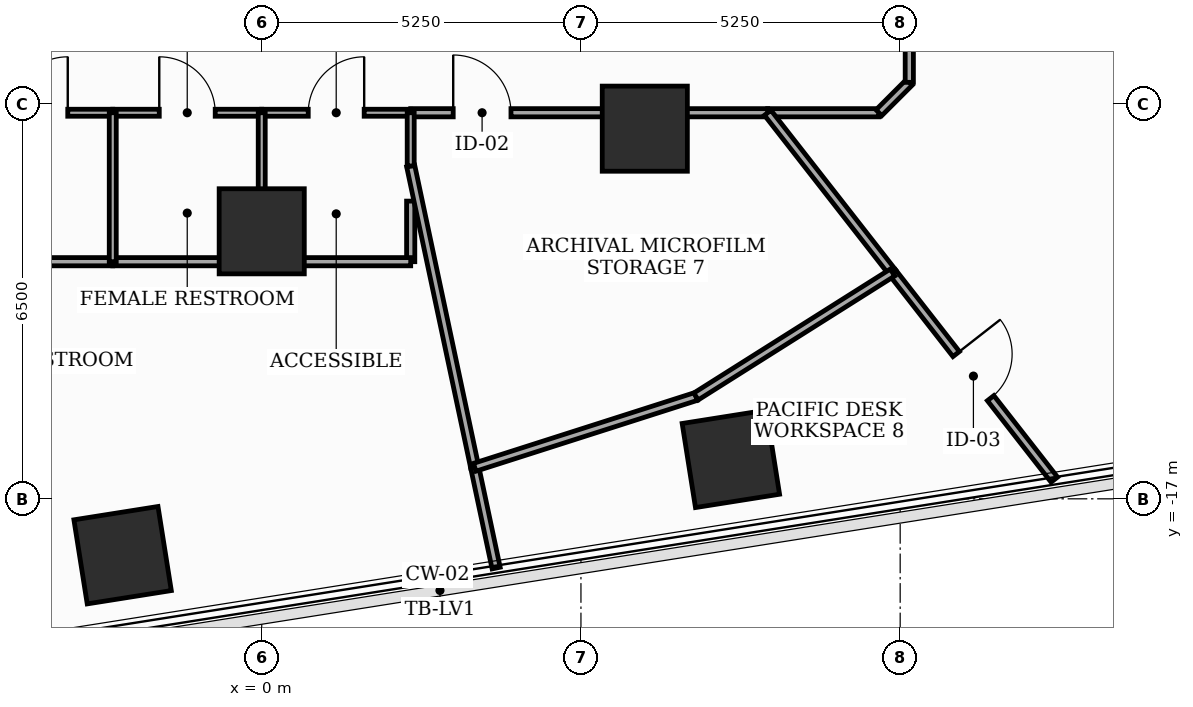
"""IFC4 building model, lengths in metres.
Left out: names, types, materials, properties, quantities, classifications, styles, units other than length and angle.
Written with IfcOpenShell. Run it as: python <this file> out.ifc"""

import sys

from ifc_helpers import new_model, si_unit, direction, frame, frame_2d, origin, origin_2d, place, context, subcontext, project, spatial, rectangle, extrude, element, fill, save


model = new_model("IFC4")
c1 = context("Model", 3, precision=1e-05, world=origin(), true_north=direction((0.0, 1.0)))
c2 = subcontext(c1, "Body", "Model", "MODEL_VIEW")
j1 = project(units=[si_unit("LENGTHUNIT", "METRE"), si_unit("PLANEANGLEUNIT", "RADIAN")], contexts=[c1])
p1 = place(None, origin())
s1 = spatial("IfcSite", under=j1, at=p1, CompositionType="ELEMENT")
p2 = place(p1, origin())
s2 = spatial("IfcBuilding", under=s1, at=p2, CompositionType="ELEMENT")
p3 = place(p2, frame((0.0, 0.0, 81.5)))
s3 = spatial("IfcBuildingStorey", under=s2, at=p3, CompositionType="ELEMENT", Elevation=81.5)
for number, where, z_axis, x_axis in (
    (1, (0.0, -12.6, 0.0), (0.0, 0.0, 1.0), (1.0, 0.0, 0.0)),
    (2, (6.3, -10.912, 0.0), (0.0, 0.0, 1.0), (1.0, 0.0, 0.0)),
    (3, (-2.288, -17.927, 0.0), (0.0, 0.0, 1.0), (0.988, 0.156, 0.0)),
    (4, (7.716, -16.343, 0.0), (0.0, 0.0, 1.0), (0.988, 0.156, 0.0)),
):
    element("IfcColumn", number, at=place(p3, frame(where, z_axis=z_axis, x_axis=x_axis)), inside=s3, PredefinedType="COLUMN", context=c2, shape_type="SweptSolid", body=[
        extrude(rectangle(XDim=1.4, YDim=1.4, at=origin_2d()), origin(), (0.0, 0.0, 1.0), 3.7),
    ])
p4 = place(p3, frame((8.321, -10.65, 0.0), z_axis=(0.0, 0.0, 1.0), x_axis=(1.0, 0.0, 0.0)))
e5 = element("IfcWall", 5, at=p4, inside=s3, PredefinedType="PARTITIONING", context=c2, shape_type="SweptSolid", body=[
    extrude(rectangle(XDim=1.829, YDim=0.135, at=frame_2d((0.915, 0.0))), origin(), (0.0, 0.0, 1.0), 3.46),
])
p5 = place(p3, frame((10.15, -10.65, 0.0), z_axis=(0.0, 0.0, 1.0), x_axis=(0.707106781187, 0.707106781187, 0.0)))
e6 = element("IfcWall", 6, at=p5, inside=s3, PredefinedType="PARTITIONING", context=c2, shape_type="SweptSolid", body=[
    extrude(rectangle(XDim=0.707, YDim=0.135, at=frame_2d((0.354, 0.0))), origin(), (0.0, 0.0, 1.0), 3.46),
])
p6 = place(p3, frame((10.65, -10.15, 0.0), z_axis=(0.0, 0.0, 1.0), x_axis=(0.0, 1.0, 0.0)))
e7 = element("IfcWall", 7, at=p6, inside=s3, PredefinedType="PARTITIONING", context=c2, shape_type="SweptSolid", body=[
    extrude(rectangle(XDim=6.158, YDim=0.135, at=frame_2d((3.079, 0.0))), origin(), (0.0, 0.0, 1.0), 2.045),
])
p7 = place(p3, frame((-4.85, -10.65, 0.0), z_axis=(0.0, 0.0, 1.0), x_axis=(1.0, 0.0, 0.0)))
e8 = element("IfcWall", 8, at=p7, inside=s3, PredefinedType="PARTITIONING", context=c2, shape_type="SweptSolid", body=[
    extrude(rectangle(XDim=2.4, YDim=0.115, at=frame_2d((1.2, 0.0))), origin(), (0.0, 0.0, 1.0), 3.46),
])
p8 = place(p7, frame((0.74, 0.0, 0.0)))
e9 = element("IfcOpeningElement", 9, at=p8, cuts=e8, PredefinedType="OPENING", context=c2, shape_type="SweptSolid", body=[
    extrude(rectangle(XDim=0.92, YDim=2.1, at=frame_2d((0.46, 1.05))), frame((0.0, 0.067, 0.0), z_axis=(0.0, -1.0, 0.0), x_axis=(1.0, 0.0, 0.0)), (0.0, 0.0, 1.0), 0.135),
])
p9 = place(p3, frame((-2.45, -10.65, 0.0), z_axis=(0.0, 0.0, 1.0), x_axis=(1.0, 0.0, 0.0)))
e10 = element("IfcWall", 10, at=p9, inside=s3, PredefinedType="PARTITIONING", context=c2, shape_type="SweptSolid", body=[
    extrude(rectangle(XDim=2.45, YDim=0.115, at=frame_2d((1.225, 0.0))), origin(), (0.0, 0.0, 1.0), 2.745),
])
p10 = place(p9, frame((0.765, 0.0, 0.0)))
e11 = element("IfcOpeningElement", 11, at=p10, cuts=e10, PredefinedType="OPENING", context=c2, shape_type="SweptSolid", body=[
    extrude(rectangle(XDim=0.92, YDim=2.1, at=frame_2d((0.46, 1.05))), frame((0.0, 0.067, 0.0), z_axis=(0.0, -1.0, 0.0), x_axis=(1.0, 0.0, 0.0)), (0.0, 0.0, 1.0), 0.135),
])
p11 = place(p3, frame((0.0, -10.65, 0.0), z_axis=(0.0, 0.0, 1.0), x_axis=(1.0, 0.0, 0.0)))
e12 = element("IfcWall", 12, at=p11, inside=s3, PredefinedType="PARTITIONING", context=c2, shape_type="SweptSolid", body=[
    extrude(rectangle(XDim=2.45, YDim=0.115, at=frame_2d((1.225, 0.0))), origin(), (0.0, 0.0, 1.0), 3.46),
])
p12 = place(p11, frame((0.765, 0.0, 0.0)))
e13 = element("IfcOpeningElement", 13, at=p12, cuts=e12, PredefinedType="OPENING", context=c2, shape_type="SweptSolid", body=[
    extrude(rectangle(XDim=0.92, YDim=2.1, at=frame_2d((0.46, 1.05))), frame((0.0, 0.067, 0.0), z_axis=(0.0, -1.0, 0.0), x_axis=(1.0, 0.0, 0.0)), (0.0, 0.0, 1.0), 0.135),
])
p13 = place(p3, frame((2.45, -10.65, 0.0), z_axis=(0.0, 0.0, 1.0), x_axis=(1.0, 0.0, 0.0)))
e14 = element("IfcWall", 14, at=p13, inside=s3, PredefinedType="PARTITIONING", context=c2, shape_type="SweptSolid", body=[
    extrude(rectangle(XDim=5.871, YDim=0.135, at=frame_2d((2.936, 0.0))), origin(), (0.0, 0.0, 1.0), 2.045),
])
p14 = place(p13, frame((0.699, 0.0, 0.0)))
e15 = element("IfcOpeningElement", 15, at=p14, cuts=e14, PredefinedType="OPENING", context=c2, shape_type="SweptSolid", body=[
    extrude(rectangle(XDim=0.95, YDim=2.0, at=frame_2d((0.475, 1.0))), frame((0.0, 0.077, 0.0), z_axis=(0.0, -1.0, 0.0), x_axis=(1.0, 0.0, 0.0)), (0.0, 0.0, 1.0), 0.155),
])
p15 = place(p3, frame((8.321, -10.65, 0.0), z_axis=(0.0, 0.0, 1.0), x_axis=(0.615591477706, -0.788065436735, 0.0)))
e16 = element("IfcWall", 16, at=p15, inside=s3, PredefinedType="PARTITIONING", context=c2, shape_type="SweptSolid", body=[
    extrude(rectangle(XDim=3.335, YDim=0.135, at=frame_2d((1.667, 0.0))), origin(), (0.0, 0.0, 1.0), 3.46),
])
p16 = place(p3, frame((10.374, -13.278, 0.0), z_axis=(0.0, 0.0, 1.0), x_axis=(0.615554166302, -0.78809458084, 0.0)))
e17 = element("IfcWall", 17, at=p16, inside=s3, PredefinedType="PARTITIONING", context=c2, shape_type="SweptSolid", body=[
    extrude(rectangle(XDim=4.323, YDim=0.135, at=frame_2d((2.161, 0.0))), origin(), (0.0, 0.0, 1.0), 2.045),
])
p17 = place(p16, frame((1.701, 0.0, 0.0)))
e18 = element("IfcOpeningElement", 18, at=p17, cuts=e17, PredefinedType="OPENING", context=c2, shape_type="SweptSolid", body=[
    extrude(rectangle(XDim=0.92, YDim=2.0, at=frame_2d((0.46, 1.0))), frame((0.0, 0.077, 0.0), z_axis=(0.0, -1.0, 0.0), x_axis=(1.0, 0.0, 0.0)), (0.0, 0.0, 1.0), 0.155),
])
p18 = place(p3, frame((-2.45, -13.1, 0.0), z_axis=(0.0, 0.0, 1.0), x_axis=(-1.0, 0.0, 0.0)))
e19 = element("IfcWall", 19, at=p18, inside=s3, PredefinedType="PARTITIONING", context=c2, shape_type="SweptSolid", body=[
    extrude(rectangle(XDim=2.4, YDim=0.135, at=frame_2d((1.2, 0.0))), origin(), (0.0, 0.0, 1.0), 3.46),
])
p19 = place(p3, frame((0.0, -13.1, 0.0), z_axis=(0.0, 0.0, 1.0), x_axis=(-1.0, 0.0, 0.0)))
e20 = element("IfcWall", 20, at=p19, inside=s3, PredefinedType="PARTITIONING", context=c2, shape_type="SweptSolid", body=[
    extrude(rectangle(XDim=2.45, YDim=0.135, at=frame_2d((1.225, 0.0))), origin(), (0.0, 0.0, 1.0), 2.045),
])
p20 = place(p3, frame((2.45, -12.103, 0.0), z_axis=(0.0, 0.0, 1.0), x_axis=(0.0, -1.0, 0.0)))
e21 = element("IfcWall", 21, at=p20, inside=s3, PredefinedType="PARTITIONING", context=c2, shape_type="SweptSolid", body=[
    extrude(rectangle(XDim=0.997, YDim=0.135, at=frame_2d((0.499, 0.0))), origin(), (0.0, 0.0, 1.0), 2.745),
])
p21 = place(p3, frame((2.45, -13.1, 0.0), z_axis=(0.0, 0.0, 1.0), x_axis=(-1.0, 0.0, 0.0)))
e22 = element("IfcWall", 22, at=p21, inside=s3, PredefinedType="PARTITIONING", context=c2, shape_type="SweptSolid", body=[
    extrude(rectangle(XDim=2.45, YDim=0.135, at=frame_2d((1.225, 0.0))), origin(), (0.0, 0.0, 1.0), 2.045),
])
p22 = place(p3, frame((3.503, -16.481, 0.0), z_axis=(0.0, 0.0, 1.0), x_axis=(-0.207863367053, 0.97815787102, 0.0)))
e23 = element("IfcWall", 23, at=p22, inside=s3, PredefinedType="PARTITIONING", context=c2, shape_type="SweptSolid", body=[
    extrude(rectangle(XDim=5.066, YDim=0.135, at=frame_2d((2.533, 0.0))), origin(), (0.0, 0.0, 1.0), 2.045),
])
p23 = place(p3, frame((3.855, -18.139, 0.0), z_axis=(0.0, 0.0, 1.0), x_axis=(-0.207875985054, 0.978155189547, 0.0)))
e24 = element("IfcWall", 24, at=p23, inside=s3, PredefinedType="PARTITIONING", context=c2, shape_type="SweptSolid", body=[
    extrude(rectangle(XDim=1.695, YDim=0.135, at=frame_2d((0.847, 0.0))), origin(), (0.0, 0.0, 1.0), 2.045),
])
p24 = place(p3, frame((-2.45, -13.1, 0.0), z_axis=(0.0, 0.0, 1.0), x_axis=(0.0, 1.0, 0.0)))
e25 = element("IfcWall", 25, at=p24, inside=s3, PredefinedType="PARTITIONING", context=c2, shape_type="SweptSolid", body=[
    extrude(rectangle(XDim=2.45, YDim=0.115, at=frame_2d((1.225, 0.0))), origin(), (0.0, 0.0, 1.0), 2.745),
])
p25 = place(p3, frame((0.0, -13.1, 0.0), z_axis=(0.0, 0.0, 1.0), x_axis=(0.0, 1.0, 0.0)))
e26 = element("IfcWall", 26, at=p25, inside=s3, PredefinedType="PARTITIONING", context=c2, shape_type="SweptSolid", body=[
    extrude(rectangle(XDim=2.45, YDim=0.115, at=frame_2d((1.225, 0.0))), origin(), (0.0, 0.0, 1.0), 2.045),
])
p26 = place(p3, frame((2.45, -11.526, 0.0), z_axis=(0.0, 0.0, 1.0), x_axis=(0.0, 1.0, 0.0)))
e27 = element("IfcWall", 27, at=p26, inside=s3, PredefinedType="PARTITIONING", context=c2, shape_type="SweptSolid", body=[
    extrude(rectangle(XDim=0.876, YDim=0.115, at=frame_2d((0.438, 0.0))), origin(), (0.0, 0.0, 1.0), 3.46),
])
p27 = place(p3, frame((3.503, -16.481, 0.0), z_axis=(0.0, 0.0, 1.0), x_axis=(0.952459752792, 0.304664437227, 0.0)))
e28 = element("IfcWall", 28, at=p27, inside=s3, PredefinedType="PARTITIONING", context=c2, shape_type="SweptSolid", body=[
    extrude(rectangle(XDim=3.821, YDim=0.135, at=frame_2d((1.91, 0.0))), origin(), (0.0, 0.0, 1.0), 2.045),
])
p28 = place(p3, frame((7.142, -15.317, 0.0), z_axis=(0.0, 0.0, 1.0), x_axis=(0.845772681814, 0.533543410321, 0.0)))
e29 = element("IfcWall", 29, at=p28, inside=s3, PredefinedType="PARTITIONING", context=c2, shape_type="SweptSolid", body=[
    extrude(rectangle(XDim=3.821, YDim=0.135, at=frame_2d((1.911, 0.0))), origin(), (0.0, 0.0, 1.0), 2.045),
])
p29 = place(p8, origin())
e30 = element("IfcDoor", 30, at=p29, inside=s3, OperationType="SINGLE_SWING_RIGHT", PredefinedType="DOOR", context=c2, shape_type="SweptSolid", body=[
    extrude(rectangle(XDim=0.92, YDim=2.1, at=frame_2d((0.46, 1.05))), frame((0.0, 0.025, 0.0), z_axis=(0.0, -1.0, 0.0), x_axis=(1.0, 0.0, 0.0)), (0.0, 0.0, 1.0), 0.05),
])
fill(e9, e30)
p30 = place(p10, origin())
e31 = element("IfcDoor", 31, at=p30, inside=s3, OperationType="SINGLE_SWING_LEFT", PredefinedType="DOOR", context=c2, shape_type="SweptSolid", body=[
    extrude(rectangle(XDim=0.92, YDim=2.1, at=frame_2d((0.46, 1.05))), frame((0.0, 0.025, 0.0), z_axis=(0.0, -1.0, 0.0), x_axis=(1.0, 0.0, 0.0)), (0.0, 0.0, 1.0), 0.05),
])
fill(e11, e31)
p31 = place(p12, origin())
e32 = element("IfcDoor", 32, at=p31, inside=s3, OperationType="SINGLE_SWING_RIGHT", PredefinedType="DOOR", context=c2, shape_type="SweptSolid", body=[
    extrude(rectangle(XDim=0.92, YDim=2.1, at=frame_2d((0.46, 1.05))), frame((0.0, 0.025, 0.0), z_axis=(0.0, -1.0, 0.0), x_axis=(1.0, 0.0, 0.0)), (0.0, 0.0, 1.0), 0.05),
])
fill(e13, e32)
p32 = place(p14, origin())
e33 = element("IfcDoor", 33, at=p32, inside=s3, OperationType="SINGLE_SWING_LEFT", PredefinedType="DOOR", context=c2, shape_type="SweptSolid", body=[
    extrude(rectangle(XDim=0.95, YDim=2.0, at=frame_2d((0.475, 1.0))), frame((0.0, 0.025, 0.0), z_axis=(0.0, -1.0, 0.0), x_axis=(1.0, 0.0, 0.0)), (0.0, 0.0, 1.0), 0.05),
])
fill(e15, e33)
p33 = place(p17, origin())
e34 = element("IfcDoor", 34, at=p33, inside=s3, OperationType="SINGLE_SWING_LEFT", PredefinedType="DOOR", context=c2, shape_type="SweptSolid", body=[
    extrude(rectangle(XDim=0.92, YDim=2.0, at=frame_2d((0.46, 1.0))), frame((0.0, 0.025, 0.0), z_axis=(0.0, -1.0, 0.0), x_axis=(1.0, 0.0, 0.0)), (0.0, 0.0, 1.0), 0.05),
])
fill(e18, e34)
save(model, sys.argv[1])
